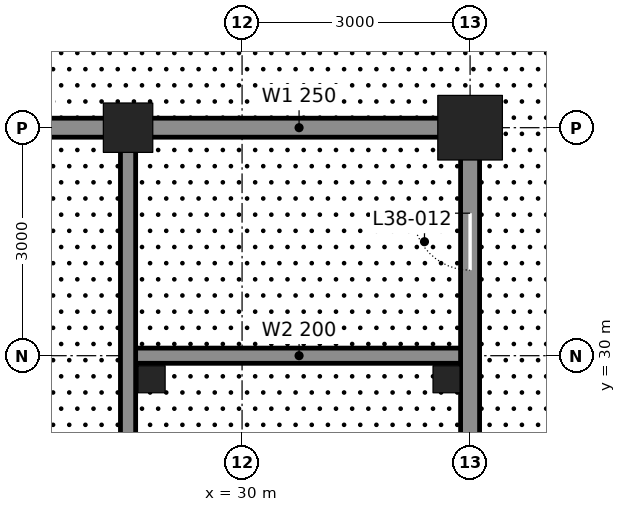
"""IFC4 building model, lengths in metres.
Left out: names, types, materials, properties, quantities, classifications, styles, units other than length and angle.
Written with IfcOpenShell. Run it as: python <this file> out.ifc"""

import sys

from ifc_helpers import new_model, si_unit, direction, frame, frame_2d, origin, origin_2d, place, context, subcontext, project, spatial, rectangle, hollow_rectangle, extrude, element, fill, save


model = new_model("IFC4")
c1 = context("Model", 3, precision=1e-05, world=origin(), true_north=direction((0.0, 1.0)))
c2 = subcontext(c1, "Body", "Model", "MODEL_VIEW")
j1 = project(units=[si_unit("LENGTHUNIT", "METRE"), si_unit("PLANEANGLEUNIT", "RADIAN")], contexts=[c1])
p1 = place(None, origin())
s1 = spatial("IfcSite", under=j1, at=p1, CompositionType="ELEMENT")
p2 = place(p1, origin())
s2 = spatial("IfcBuilding", under=s1, at=p2, CompositionType="ELEMENT")
p3 = place(p2, frame((0.0, 0.0, 174.0)))
s3 = spatial("IfcBuildingStorey", under=s2, at=p3, CompositionType="ELEMENT", Elevation=174.0)
p4 = place(p3, frame((28.5, 33.0, 0.0), z_axis=(0.0, 0.0, 1.0), x_axis=(1.0, 0.0, 0.0)))
e1 = element("IfcColumn", 1, at=p4, inside=s3, PredefinedType="COLUMN", context=c2, shape_type="SweptSolid", body=[
    extrude(hollow_rectangle(XDim=0.65, YDim=0.65, WallThickness=0.065, at=origin_2d()), origin(), (0.0, 0.0, 1.0), 6.0),
])
p5 = place(p3, frame((33.0, 33.0, 0.0), z_axis=(0.0, 0.0, 1.0), x_axis=(1.0, 0.0, 0.0)))
e2 = element("IfcColumn", 2, at=p5, inside=s3, PredefinedType="COLUMN", context=c2, shape_type="SweptSolid", body=[
    extrude(hollow_rectangle(XDim=0.85, YDim=0.85, WallThickness=0.085, at=origin_2d()), origin(), (0.0, 0.0, 1.0), 6.0),
])
p6 = place(p3, frame((28.5, 30.0, 0.0), z_axis=(0.0, 0.0, 1.0), x_axis=(1.0, 0.0, 0.0)))
e3 = element("IfcWall", 3, at=p6, inside=s3, PredefinedType="SOLIDWALL", context=c2, shape_type="SweptSolid", body=[
    extrude(rectangle(XDim=4.5, YDim=0.2, at=frame_2d((2.25, 0.0))), origin(), (0.0, 0.0, 1.0), 5.84),
])
p7 = place(p3, frame((25.75, 33.0, 0.0), z_axis=(0.0, 0.0, 1.0), x_axis=(1.0, 0.0, 0.0)))
e4 = element("IfcWall", 4, at=p7, inside=s3, PredefinedType="SOLIDWALL", context=c2, shape_type="SweptSolid", body=[
    extrude(rectangle(XDim=2.5, YDim=0.25, at=frame_2d((1.25, 0.0))), origin(), (0.0, 0.0, 1.0), 4.981),
])
p8 = place(p3, frame((28.75, 33.0, 0.0), z_axis=(0.0, 0.0, 1.0), x_axis=(1.0, 0.0, 0.0)))
e5 = element("IfcWall", 5, at=p8, inside=s3, PredefinedType="SOLIDWALL", context=c2, shape_type="SweptSolid", body=[
    extrude(rectangle(XDim=4.0, YDim=0.25, at=frame_2d((2.0, 0.0))), origin(), (0.0, 0.0, 1.0), 4.981),
])
p9 = place(p3, frame((28.5, 24.25, 0.0), z_axis=(0.0, 0.0, 1.0), x_axis=(0.0, 1.0, 0.0)))
e6 = element("IfcWall", 6, at=p9, inside=s3, PredefinedType="SOLIDWALL", context=c2, shape_type="SweptSolid", body=[
    extrude(rectangle(XDim=8.5, YDim=0.2, at=frame_2d((4.25, 0.0))), origin(), (0.0, 0.0, 1.0), 4.913),
])
p10 = place(p3, frame((33.0, 24.25, 0.0), z_axis=(0.0, 0.0, 1.0), x_axis=(0.0, 1.0, 0.0)))
e7 = element("IfcWall", 7, at=p10, inside=s3, PredefinedType="SOLIDWALL", context=c2, shape_type="SweptSolid", body=[
    extrude(rectangle(XDim=8.5, YDim=0.25, at=frame_2d((4.25, 0.0))), origin(), (0.0, 0.0, 1.0), 4.913),
])
p11 = place(p10, frame((6.875, 0.0, 0.0)))
e8 = element("IfcOpeningElement", 8, at=p11, cuts=e7, PredefinedType="OPENING", context=c2, shape_type="SweptSolid", body=[
    extrude(rectangle(XDim=0.75, YDim=2.1, at=frame_2d((0.375, 1.05))), frame((0.0, 0.135, 0.0), z_axis=(0.0, -1.0, 0.0), x_axis=(1.0, 0.0, 0.0)), (0.0, 0.0, 1.0), 0.27),
])
for number, where, z_axis, x_axis in (
    (9, (28.81, 29.69, 0.0), (0.0, 0.0, 1.0), (1.0, 0.0, 0.0)),
    (10, (32.69, 29.69, 0.0), (0.0, 0.0, 1.0), (1.0, 0.0, 0.0)),
):
    element("IfcColumn", number, at=place(p3, frame(where, z_axis=z_axis, x_axis=x_axis)), inside=s3, PredefinedType="COLUMN", context=c2, shape_type="SweptSolid", body=[
        extrude(hollow_rectangle(XDim=0.356, YDim=0.356, WallThickness=0.015, at=origin_2d()), origin(), (0.0, 0.0, 1.0), 6.0),
    ])
p12 = place(p11, origin())
e11 = element("IfcDoor", 11, at=p12, inside=s3, OperationType="SINGLE_SWING_RIGHT", PredefinedType="DOOR", context=c2, shape_type="SweptSolid", body=[
    extrude(rectangle(XDim=0.75, YDim=2.1, at=frame_2d((0.375, 1.05))), frame((0.0, 0.025, 0.0), z_axis=(0.0, -1.0, 0.0), x_axis=(1.0, 0.0, 0.0)), (0.0, 0.0, 1.0), 0.05),
])
fill(e8, e11)
save(model, sys.argv[1])
